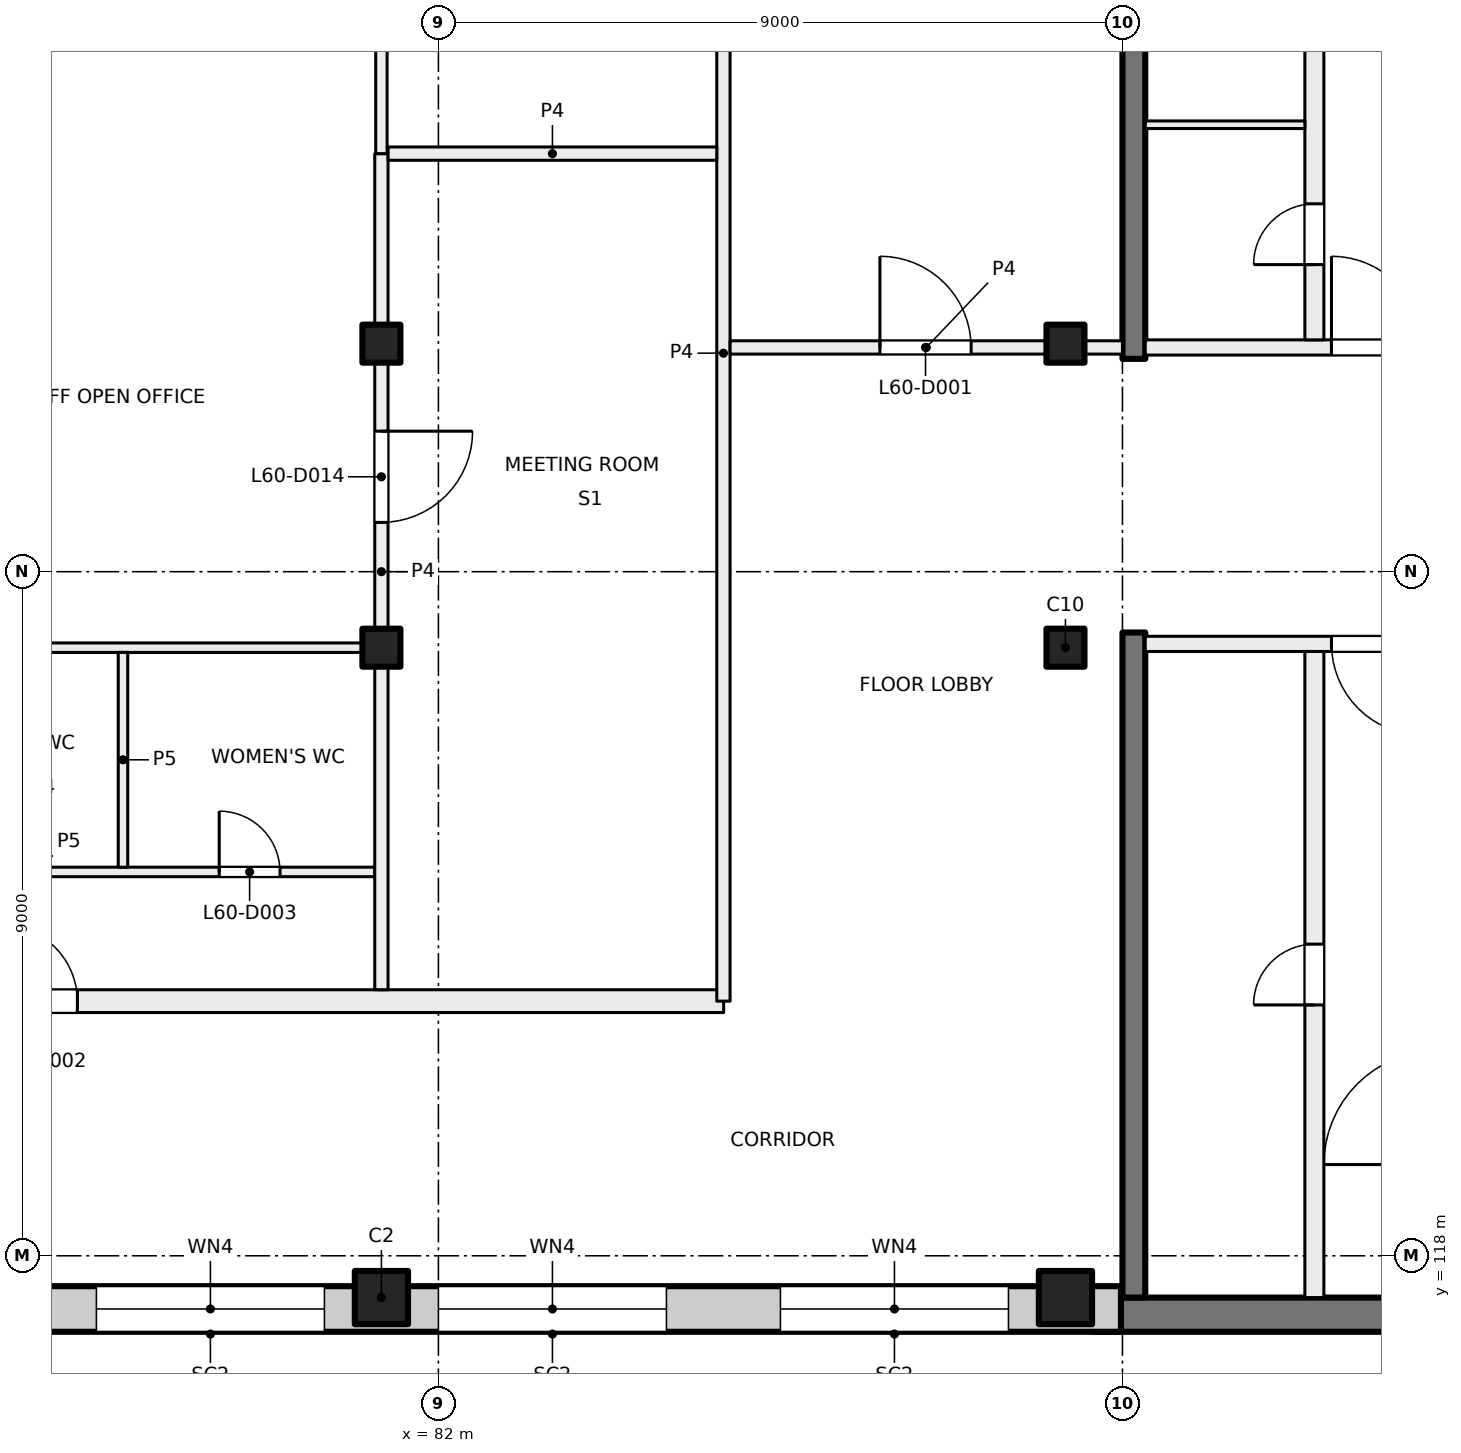
"""IFC4 building model, lengths in metres.
Left out: names, types, materials, properties, quantities, classifications, styles, units other than length and angle.
Written with IfcOpenShell. Run it as: python <this file> out.ifc"""

import sys

from ifc_helpers import new_model, si_unit, direction, frame, frame_2d, origin, origin_2d, place, context, subcontext, project, spatial, rectangle, extrude, element, fill, save


model = new_model("IFC4")
c1 = context("Model", 3, precision=1e-05, world=origin(), true_north=direction((0.0, 1.0)))
c2 = subcontext(c1, "Body", "Model", "MODEL_VIEW")
j1 = project(units=[si_unit("LENGTHUNIT", "METRE"), si_unit("PLANEANGLEUNIT", "RADIAN")], contexts=[c1])
p1 = place(None, origin())
s1 = spatial("IfcSite", under=j1, at=p1, CompositionType="ELEMENT")
p2 = place(p1, origin())
s2 = spatial("IfcBuilding", under=s1, at=p2, CompositionType="ELEMENT")
p3 = place(p2, frame((0.0, 0.0, 253.5)))
s3 = spatial("IfcBuildingStorey", under=s2, at=p3, CompositionType="ELEMENT", Elevation=253.5)
for number, where, z_axis, x_axis in (
    (1, (81.25, 130.0, 0.0), (0.0, 0.0, 1.0), (1.0, 0.0, 0.0)),
    (2, (90.25, 130.0, 0.0), (0.0, 0.0, 1.0), (1.0, 0.0, 0.0)),
    (3, (81.25, 126.0, 0.0), (0.0, 0.0, 1.0), (1.0, 0.0, 0.0)),
    (4, (90.25, 126.0, 0.0), (0.0, 0.0, 1.0), (1.0, 0.0, 0.0)),
):
    element("IfcColumn", number, at=place(p3, frame(where, z_axis=z_axis, x_axis=x_axis)), inside=s3, PredefinedType="COLUMN", context=c2, shape_type="SweptSolid", body=[
        extrude(rectangle(XDim=0.5, YDim=0.5, at=origin_2d()), origin(), (0.0, 0.0, 1.0), 4.0),
    ])
for number, where, z_axis, x_axis in (
    (5, (81.25, 117.45, 0.0), (0.0, 0.0, 1.0), (1.0, 0.0, 0.0)),
    (6, (90.25, 117.45, 0.0), (0.0, 0.0, 1.0), (1.0, 0.0, 0.0)),
):
    element("IfcColumn", number, at=place(p3, frame(where, z_axis=z_axis, x_axis=x_axis)), inside=s3, PredefinedType="COLUMN", context=c2, shape_type="SweptSolid", body=[
        extrude(rectangle(XDim=0.7, YDim=0.7, at=origin_2d()), origin(), (0.0, 0.0, 1.0), 4.0),
    ])
p4 = place(p3, frame((99.6, 117.225, 0.0), z_axis=(0.0, 0.0, 1.0), x_axis=(-1.0, 0.0, 0.0)))
e7 = element("IfcWall", 7, at=p4, inside=s3, PredefinedType="SHEAR", context=c2, shape_type="SweptSolid", body=[
    extrude(rectangle(XDim=9.0, YDim=0.45, at=frame_2d((4.5, 0.0))), origin(), (0.0, 0.0, 1.0), 4.0),
])
for number, where, z_axis, x_axis in (
    (8, (91.15, 138.55, 0.0), (0.0, 0.0, 1.0), (0.0, -1.0, 0.0)),
    (9, (91.15, 126.2, 0.0), (0.0, 0.0, 1.0), (0.0, -1.0, 0.0)),
):
    element("IfcWall", number, at=place(p3, frame(where, z_axis=z_axis, x_axis=x_axis)), inside=s3, PredefinedType="SHEAR", context=c2, shape_type="SweptSolid", body=[
        extrude(rectangle(XDim=8.75, YDim=0.3, at=frame_2d((4.375, 0.0))), origin(), (0.0, 0.0, 1.0), 4.0),
    ])
p5 = place(p3, frame((90.98, 117.3, 0.0), z_axis=(0.0, 0.0, 1.0), x_axis=(-1.0, 0.0, 0.0)))
e10 = element("IfcWall", 10, at=p5, inside=s3, PredefinedType="SOLIDWALL", context=c2, shape_type="SweptSolid", body=[
    extrude(rectangle(XDim=43.98, YDim=0.6, at=frame_2d((21.99, 0.0))), origin(), (0.0, 0.0, 1.0), 3.625),
])
p6 = place(p5, frame((1.48, 0.0, 0.9)))
e11 = element("IfcOpeningElement", 11, at=p6, cuts=e10, PredefinedType="OPENING", context=c2, shape_type="SweptSolid", body=[
    extrude(rectangle(XDim=3.0, YDim=2.4, at=frame_2d((1.5, 1.2))), frame((0.0, 0.31, 0.0), z_axis=(0.0, -1.0, 0.0), x_axis=(1.0, 0.0, 0.0)), (0.0, 0.0, 1.0), 0.62),
])
p7 = place(p5, frame((5.98, 0.0, 0.9)))
e12 = element("IfcOpeningElement", 12, at=p7, cuts=e10, PredefinedType="OPENING", context=c2, shape_type="SweptSolid", body=[
    extrude(rectangle(XDim=3.0, YDim=2.4, at=frame_2d((1.5, 1.2))), frame((0.0, 0.31, 0.0), z_axis=(0.0, -1.0, 0.0), x_axis=(1.0, 0.0, 0.0)), (0.0, 0.0, 1.0), 0.62),
])
p8 = place(p5, frame((10.48, 0.0, 0.9)))
e13 = element("IfcOpeningElement", 13, at=p8, cuts=e10, PredefinedType="OPENING", context=c2, shape_type="SweptSolid", body=[
    extrude(rectangle(XDim=3.0, YDim=2.4, at=frame_2d((1.5, 1.2))), frame((0.0, 0.31, 0.0), z_axis=(0.0, -1.0, 0.0), x_axis=(1.0, 0.0, 0.0)), (0.0, 0.0, 1.0), 0.62),
])
p9 = place(p5, frame((14.98, 0.0, 0.9)))
e14 = element("IfcOpeningElement", 14, at=p9, cuts=e10, PredefinedType="OPENING", context=c2, shape_type="SweptSolid", body=[
    extrude(rectangle(XDim=3.0, YDim=2.4, at=frame_2d((1.5, 1.2))), frame((0.0, 0.31, 0.0), z_axis=(0.0, -1.0, 0.0), x_axis=(1.0, 0.0, 0.0)), (0.0, 0.0, 1.0), 0.62),
])
p10 = place(p5, frame((19.48, 0.0, 0.9)))
e15 = element("IfcOpeningElement", 15, at=p10, cuts=e10, PredefinedType="OPENING", context=c2, shape_type="SweptSolid", body=[
    extrude(rectangle(XDim=3.0, YDim=2.4, at=frame_2d((1.5, 1.2))), frame((0.0, 0.31, 0.0), z_axis=(0.0, -1.0, 0.0), x_axis=(1.0, 0.0, 0.0)), (0.0, 0.0, 1.0), 0.62),
])
p11 = place(p5, frame((24.58, 0.0, 0.0)))
e16 = element("IfcOpeningElement", 16, at=p11, cuts=e10, PredefinedType="OPENING", context=c2, shape_type="SweptSolid", body=[
    extrude(rectangle(XDim=1.8, YDim=2.4, at=frame_2d((0.9, 1.2))), frame((0.0, 0.31, 0.0), z_axis=(0.0, -1.0, 0.0), x_axis=(1.0, 0.0, 0.0)), (0.0, 0.0, 1.0), 0.62),
])
p12 = place(p5, frame((28.48, 0.0, 0.9)))
e17 = element("IfcOpeningElement", 17, at=p12, cuts=e10, PredefinedType="OPENING", context=c2, shape_type="SweptSolid", body=[
    extrude(rectangle(XDim=3.0, YDim=2.4, at=frame_2d((1.5, 1.2))), frame((0.0, 0.31, 0.0), z_axis=(0.0, -1.0, 0.0), x_axis=(1.0, 0.0, 0.0)), (0.0, 0.0, 1.0), 0.62),
])
p13 = place(p5, frame((32.98, 0.0, 0.9)))
e18 = element("IfcOpeningElement", 18, at=p13, cuts=e10, PredefinedType="OPENING", context=c2, shape_type="SweptSolid", body=[
    extrude(rectangle(XDim=3.0, YDim=2.4, at=frame_2d((1.5, 1.2))), frame((0.0, 0.31, 0.0), z_axis=(0.0, -1.0, 0.0), x_axis=(1.0, 0.0, 0.0)), (0.0, 0.0, 1.0), 0.62),
])
p14 = place(p5, frame((38.08, 0.0, 0.0)))
e19 = element("IfcOpeningElement", 19, at=p14, cuts=e10, PredefinedType="OPENING", context=c2, shape_type="SweptSolid", body=[
    extrude(rectangle(XDim=1.8, YDim=2.4, at=frame_2d((0.9, 1.2))), frame((0.0, 0.31, 0.0), z_axis=(0.0, -1.0, 0.0), x_axis=(1.0, 0.0, 0.0)), (0.0, 0.0, 1.0), 0.62),
])
p15 = place(p3, frame((95.25, 126.05, 0.0), z_axis=(0.0, 0.0, 1.0), x_axis=(-1.0, 0.0, 0.0)))
e20 = element("IfcWall", 20, at=p15, inside=s3, PredefinedType="PARTITIONING", context=c2, shape_type="SweptSolid", body=[
    extrude(rectangle(XDim=3.95, YDim=0.2, at=frame_2d((1.975, 0.0))), origin(), (0.0, 0.0, 1.0), 3.625),
])
p16 = place(p15, frame((0.3, 0.0, 0.0)))
e21 = element("IfcOpeningElement", 21, at=p16, cuts=e20, PredefinedType="OPENING", context=c2, shape_type="SweptSolid", body=[
    extrude(rectangle(XDim=1.2, YDim=2.1, at=frame_2d((0.6, 1.05))), frame((0.0, 0.11, 0.0), z_axis=(0.0, -1.0, 0.0), x_axis=(1.0, 0.0, 0.0)), (0.0, 0.0, 1.0), 0.22),
])
p17 = place(p3, frame((93.525, 117.45, 0.0), z_axis=(0.0, 0.0, 1.0), x_axis=(0.0, 1.0, 0.0)))
e22 = element("IfcWall", 22, at=p17, inside=s3, PredefinedType="PARTITIONING", context=c2, shape_type="SweptSolid", body=[
    extrude(rectangle(XDim=8.5, YDim=0.25, at=frame_2d((4.25, 0.0))), origin(), (0.0, 0.0, 1.0), 3.625),
])
p18 = place(p17, frame((3.85, 0.0, 0.0)))
e23 = element("IfcOpeningElement", 23, at=p18, cuts=e22, PredefinedType="OPENING", context=c2, shape_type="SweptSolid", body=[
    extrude(rectangle(XDim=0.8, YDim=2.1, at=frame_2d((0.4, 1.05))), frame((0.0, 0.135, 0.0), z_axis=(0.0, -1.0, 0.0), x_axis=(1.0, 0.0, 0.0)), (0.0, 0.0, 1.0), 0.27),
])
p19 = place(p3, frame((91.3, 129.95, 0.0), z_axis=(0.0, 0.0, 1.0), x_axis=(1.0, 0.0, 0.0)))
e24 = element("IfcWall", 24, at=p19, inside=s3, PredefinedType="PARTITIONING", context=c2, shape_type="SweptSolid", body=[
    extrude(rectangle(XDim=3.95, YDim=0.2, at=frame_2d((1.975, 0.0))), origin(), (0.0, 0.0, 1.0), 3.625),
])
p20 = place(p19, frame((2.45, 0.0, 0.0)))
e25 = element("IfcOpeningElement", 25, at=p20, cuts=e24, PredefinedType="OPENING", context=c2, shape_type="SweptSolid", body=[
    extrude(rectangle(XDim=1.2, YDim=2.1, at=frame_2d((0.6, 1.05))), frame((0.0, 0.11, 0.0), z_axis=(0.0, -1.0, 0.0), x_axis=(1.0, 0.0, 0.0)), (0.0, 0.0, 1.0), 0.22),
])
p21 = place(p3, frame((93.525, 130.05, 0.0), z_axis=(0.0, 0.0, 1.0), x_axis=(0.0, 1.0, 0.0)))
e26 = element("IfcWall", 26, at=p21, inside=s3, PredefinedType="PARTITIONING", context=c2, shape_type="SweptSolid", body=[
    extrude(rectangle(XDim=8.5, YDim=0.25, at=frame_2d((4.25, 0.0))), origin(), (0.0, 0.0, 1.0), 3.625),
])
p22 = place(p21, frame((0.99, 0.0, 0.0)))
e27 = element("IfcOpeningElement", 27, at=p22, cuts=e26, PredefinedType="OPENING", context=c2, shape_type="SweptSolid", body=[
    extrude(rectangle(XDim=0.8, YDim=2.1, at=frame_2d((0.4, 1.05))), frame((0.0, 0.135, 0.0), z_axis=(0.0, -1.0, 0.0), x_axis=(1.0, 0.0, 0.0)), (0.0, 0.0, 1.0), 0.27),
])
p23 = place(p21, frame((5.29, 0.0, 0.0)))
e28 = element("IfcOpeningElement", 28, at=p23, cuts=e26, PredefinedType="OPENING", context=c2, shape_type="SweptSolid", body=[
    extrude(rectangle(XDim=0.8, YDim=2.1, at=frame_2d((0.4, 1.05))), frame((0.0, 0.135, 0.0), z_axis=(0.0, -1.0, 0.0), x_axis=(1.0, 0.0, 0.0)), (0.0, 0.0, 1.0), 0.27),
])
p24 = place(p3, frame((91.3, 132.88, 0.0), z_axis=(0.0, 0.0, 1.0), x_axis=(1.0, 0.0, 0.0)))
e29 = element("IfcWall", 29, at=p24, inside=s3, PredefinedType="PARTITIONING", context=c2, shape_type="SweptSolid", body=[
    extrude(rectangle(XDim=2.1, YDim=0.1, at=frame_2d((1.05, 0.0))), origin(), (0.0, 0.0, 1.0), 3.625),
])
p25 = place(p3, frame((54.4, 121.35, 0.0), z_axis=(0.0, 0.0, 1.0), x_axis=(1.0, 0.0, 0.0)))
e30 = element("IfcWall", 30, at=p25, inside=s3, PredefinedType="PARTITIONING", context=c2, shape_type="SweptSolid", body=[
    extrude(rectangle(XDim=31.353, YDim=0.3, at=frame_2d((15.677, 0.0))), origin(), (0.0, 0.0, 1.0), 3.625),
])
p26 = place(p25, frame((21.85, 0.0, 0.0)))
e31 = element("IfcOpeningElement", 31, at=p26, cuts=e30, PredefinedType="OPENING", context=c2, shape_type="SweptSolid", body=[
    extrude(rectangle(XDim=1.0, YDim=2.1, at=frame_2d((0.5, 1.05))), frame((0.0, 0.16, 0.0), z_axis=(0.0, -1.0, 0.0), x_axis=(1.0, 0.0, 0.0)), (0.0, 0.0, 1.0), 0.32),
])
p27 = place(p25, frame((12.75, 0.0, 0.0)))
e32 = element("IfcOpeningElement", 32, at=p27, cuts=e30, PredefinedType="OPENING", context=c2, shape_type="SweptSolid", body=[
    extrude(rectangle(XDim=1.2, YDim=2.1, at=frame_2d((0.6, 1.05))), frame((0.0, 0.16, 0.0), z_axis=(0.0, -1.0, 0.0), x_axis=(1.0, 0.0, 0.0)), (0.0, 0.0, 1.0), 0.32),
])
p28 = place(p25, frame((3.515, 0.0, 0.0)))
e33 = element("IfcOpeningElement", 33, at=p28, cuts=e30, PredefinedType="OPENING", context=c2, shape_type="SweptSolid", body=[
    extrude(rectangle(XDim=1.8, YDim=2.1, at=frame_2d((0.9, 1.05))), frame((0.0, 0.16, 0.0), z_axis=(0.0, -1.0, 0.0), x_axis=(1.0, 0.0, 0.0)), (0.0, 0.0, 1.0), 0.32),
])
p29 = place(p3, frame((72.338, 123.05, 0.0), z_axis=(0.0, 0.0, 1.0), x_axis=(1.0, 0.0, 0.0)))
e34 = element("IfcWall", 34, at=p29, inside=s3, PredefinedType="PARTITIONING", context=c2, shape_type="SweptSolid", body=[
    extrude(rectangle(XDim=8.824, YDim=0.125, at=frame_2d((4.412, 0.0))), origin(), (0.0, 0.0, 1.0), 3.625),
])
p30 = place(p29, frame((6.778, 0.0, 0.0)))
e35 = element("IfcOpeningElement", 35, at=p30, cuts=e34, PredefinedType="OPENING", context=c2, shape_type="SweptSolid", body=[
    extrude(rectangle(XDim=0.8, YDim=2.1, at=frame_2d((0.4, 1.05))), frame((0.0, 0.073, 0.0), z_axis=(0.0, -1.0, 0.0), x_axis=(1.0, 0.0, 0.0)), (0.0, 0.0, 1.0), 0.145),
])
p31 = place(p29, frame((3.612, 0.0, 0.0)))
e36 = element("IfcOpeningElement", 36, at=p31, cuts=e34, PredefinedType="OPENING", context=c2, shape_type="SweptSolid", body=[
    extrude(rectangle(XDim=0.8, YDim=2.1, at=frame_2d((0.4, 1.05))), frame((0.0, 0.073, 0.0), z_axis=(0.0, -1.0, 0.0), x_axis=(1.0, 0.0, 0.0)), (0.0, 0.0, 1.0), 0.145),
])
p32 = place(p29, frame((0.746, 0.0, 0.0)))
e37 = element("IfcOpeningElement", 37, at=p32, cuts=e34, PredefinedType="OPENING", context=c2, shape_type="SweptSolid", body=[
    extrude(rectangle(XDim=1.0, YDim=2.1, at=frame_2d((0.5, 1.05))), frame((0.0, 0.073, 0.0), z_axis=(0.0, -1.0, 0.0), x_axis=(1.0, 0.0, 0.0)), (0.0, 0.0, 1.0), 0.145),
])
p33 = place(p3, frame((72.25, 126.0, 0.0), z_axis=(0.0, 0.0, 1.0), x_axis=(1.0, 0.0, 0.0)))
e38 = element("IfcWall", 38, at=p33, inside=s3, PredefinedType="PARTITIONING", context=c2, shape_type="SweptSolid", body=[
    extrude(rectangle(XDim=8.912, YDim=0.125, at=frame_2d((4.456, 0.0))), origin(), (0.0, 0.0, 1.0), 3.625),
])
p34 = place(p3, frame((77.85, 125.938, 0.0), z_axis=(0.0, 0.0, 1.0), x_axis=(0.0, -1.0, 0.0)))
e39 = element("IfcWall", 39, at=p34, inside=s3, PredefinedType="PARTITIONING", context=c2, shape_type="SweptSolid", body=[
    extrude(rectangle(XDim=2.826, YDim=0.125, at=frame_2d((1.413, 0.0))), origin(), (0.0, 0.0, 1.0), 3.625),
])
p35 = place(p3, frame((81.25, 132.5, 0.0), z_axis=(0.0, 0.0, 1.0), x_axis=(0.0, -1.0, 0.0)))
e40 = element("IfcWall", 40, at=p35, inside=s3, PredefinedType="PARTITIONING", context=c2, shape_type="SweptSolid", body=[
    extrude(rectangle(XDim=11.0, YDim=0.175, at=frame_2d((5.5, 0.0))), origin(), (0.0, 0.0, 1.0), 3.625),
])
p36 = place(p35, frame((3.652, 0.0, 0.0)))
e41 = element("IfcOpeningElement", 41, at=p36, cuts=e40, PredefinedType="OPENING", context=c2, shape_type="SweptSolid", body=[
    extrude(rectangle(XDim=1.2, YDim=2.1, at=frame_2d((0.6, 1.05))), frame((0.0, 0.097, 0.0), z_axis=(0.0, -1.0, 0.0), x_axis=(1.0, 0.0, 0.0)), (0.0, 0.0, 1.0), 0.195),
])
p37 = place(p3, frame((81.25, 132.5, 0.0), z_axis=(0.0, 0.0, 1.0), x_axis=(0.0, 1.0, 0.0)))
e42 = element("IfcWall", 42, at=p37, inside=s3, PredefinedType="PARTITIONING", context=c2, shape_type="SweptSolid", body=[
    extrude(rectangle(XDim=5.9, YDim=0.15, at=frame_2d((2.95, 0.0))), origin(), (0.0, 0.0, 1.0), 3.625),
])
p38 = place(p37, frame((2.45, 0.0, 0.0)))
e43 = element("IfcOpeningElement", 43, at=p38, cuts=e42, PredefinedType="OPENING", context=c2, shape_type="SweptSolid", body=[
    extrude(rectangle(XDim=1.0, YDim=2.1, at=frame_2d((0.5, 1.05))), frame((0.0, 0.085, 0.0), z_axis=(0.0, -1.0, 0.0), x_axis=(1.0, 0.0, 0.0)), (0.0, 0.0, 1.0), 0.17),
])
p39 = place(p3, frame((85.75, 121.35, 0.0), z_axis=(0.0, 0.0, 1.0), x_axis=(0.0, 1.0, 0.0)))
e44 = element("IfcWall", 44, at=p39, inside=s3, PredefinedType="PARTITIONING", context=c2, shape_type="SweptSolid", body=[
    extrude(rectangle(XDim=17.05, YDim=0.175, at=frame_2d((8.525, 0.0))), origin(), (0.0, 0.0, 1.0), 3.625),
])
p40 = place(p3, frame((85.662, 132.5, 0.0), z_axis=(0.0, 0.0, 1.0), x_axis=(-1.0, 0.0, 0.0)))
e45 = element("IfcWall", 45, at=p40, inside=s3, PredefinedType="PARTITIONING", context=c2, shape_type="SweptSolid", body=[
    extrude(rectangle(XDim=4.324, YDim=0.175, at=frame_2d((2.162, 0.0))), origin(), (0.0, 0.0, 1.0), 3.625),
])
p41 = place(p3, frame((85.838, 129.95, 0.0), z_axis=(0.0, 0.0, 1.0), x_axis=(1.0, 0.0, 0.0)))
e46 = element("IfcWall", 46, at=p41, inside=s3, PredefinedType="PARTITIONING", context=c2, shape_type="SweptSolid", body=[
    extrude(rectangle(XDim=5.162, YDim=0.175, at=frame_2d((2.581, 0.0))), origin(), (0.0, 0.0, 1.0), 3.625),
])
p42 = place(p41, frame((1.971, 0.0, 0.0)))
e47 = element("IfcOpeningElement", 47, at=p42, cuts=e46, PredefinedType="OPENING", context=c2, shape_type="SweptSolid", body=[
    extrude(rectangle(XDim=1.2, YDim=2.1, at=frame_2d((0.6, 1.05))), frame((0.0, 0.097, 0.0), z_axis=(0.0, -1.0, 0.0), x_axis=(1.0, 0.0, 0.0)), (0.0, 0.0, 1.0), 0.195),
])
p43 = place(p6, origin())
e48 = element("IfcWindow", 48, at=p43, inside=s3, PartitioningType="SINGLE_PANEL", PredefinedType="WINDOW", context=c2, shape_type="SweptSolid", body=[
    extrude(rectangle(XDim=3.0, YDim=2.4, at=frame_2d((1.5, 1.2))), frame((0.0, 0.03, 0.0), z_axis=(0.0, -1.0, 0.0), x_axis=(1.0, 0.0, 0.0)), (0.0, 0.0, 1.0), 0.06),
])
fill(e11, e48)
p44 = place(p7, origin())
e49 = element("IfcWindow", 49, at=p44, inside=s3, PartitioningType="SINGLE_PANEL", PredefinedType="WINDOW", context=c2, shape_type="SweptSolid", body=[
    extrude(rectangle(XDim=3.0, YDim=2.4, at=frame_2d((1.5, 1.2))), frame((0.0, 0.03, 0.0), z_axis=(0.0, -1.0, 0.0), x_axis=(1.0, 0.0, 0.0)), (0.0, 0.0, 1.0), 0.06),
])
fill(e12, e49)
p45 = place(p8, origin())
e50 = element("IfcWindow", 50, at=p45, inside=s3, PartitioningType="SINGLE_PANEL", PredefinedType="WINDOW", context=c2, shape_type="SweptSolid", body=[
    extrude(rectangle(XDim=3.0, YDim=2.4, at=frame_2d((1.5, 1.2))), frame((0.0, 0.03, 0.0), z_axis=(0.0, -1.0, 0.0), x_axis=(1.0, 0.0, 0.0)), (0.0, 0.0, 1.0), 0.06),
])
fill(e13, e50)
p46 = place(p16, origin())
e51 = element("IfcDoor", 51, at=p46, inside=s3, OperationType="DOUBLE_DOOR_SINGLE_SWING", PredefinedType="DOOR", context=c2, shape_type="SweptSolid", body=[
    extrude(rectangle(XDim=1.2, YDim=2.1, at=frame_2d((0.6, 1.05))), frame((0.0, 0.025, 0.0), z_axis=(0.0, -1.0, 0.0), x_axis=(1.0, 0.0, 0.0)), (0.0, 0.0, 1.0), 0.05),
])
fill(e21, e51)
p47 = place(p18, origin())
e52 = element("IfcDoor", 52, at=p47, inside=s3, OperationType="SINGLE_SWING_LEFT", PredefinedType="DOOR", context=c2, shape_type="SweptSolid", body=[
    extrude(rectangle(XDim=0.8, YDim=2.1, at=frame_2d((0.4, 1.05))), frame((0.0, 0.025, 0.0), z_axis=(0.0, -1.0, 0.0), x_axis=(1.0, 0.0, 0.0)), (0.0, 0.0, 1.0), 0.05),
])
fill(e23, e52)
p48 = place(p20, origin())
e53 = element("IfcDoor", 53, at=p48, inside=s3, OperationType="DOUBLE_DOOR_SINGLE_SWING", PredefinedType="DOOR", context=c2, shape_type="SweptSolid", body=[
    extrude(rectangle(XDim=1.2, YDim=2.1, at=frame_2d((0.6, 1.05))), frame((0.0, 0.025, 0.0), z_axis=(0.0, -1.0, 0.0), x_axis=(1.0, 0.0, 0.0)), (0.0, 0.0, 1.0), 0.05),
])
fill(e25, e53)
p49 = place(p22, origin())
e54 = element("IfcDoor", 54, at=p49, inside=s3, OperationType="SINGLE_SWING_RIGHT", PredefinedType="DOOR", context=c2, shape_type="SweptSolid", body=[
    extrude(rectangle(XDim=0.8, YDim=2.1, at=frame_2d((0.4, 1.05))), frame((0.0, 0.025, 0.0), z_axis=(0.0, -1.0, 0.0), x_axis=(1.0, 0.0, 0.0)), (0.0, 0.0, 1.0), 0.05),
])
fill(e27, e54)
p50 = place(p42, origin())
e55 = element("IfcDoor", 55, at=p50, inside=s3, OperationType="DOUBLE_DOOR_SINGLE_SWING", PredefinedType="DOOR", context=c2, shape_type="SweptSolid", body=[
    extrude(rectangle(XDim=1.2, YDim=2.1, at=frame_2d((0.6, 1.05))), frame((0.0, 0.025, 0.0), z_axis=(0.0, -1.0, 0.0), x_axis=(1.0, 0.0, 0.0)), (0.0, 0.0, 1.0), 0.05),
])
fill(e47, e55)
p51 = place(p26, origin())
e56 = element("IfcDoor", 56, at=p51, inside=s3, OperationType="SINGLE_SWING_LEFT", PredefinedType="DOOR", context=c2, shape_type="SweptSolid", body=[
    extrude(rectangle(XDim=1.0, YDim=2.1, at=frame_2d((0.5, 1.05))), frame((0.0, 0.025, 0.0), z_axis=(0.0, -1.0, 0.0), x_axis=(1.0, 0.0, 0.0)), (0.0, 0.0, 1.0), 0.05),
])
fill(e31, e56)
p52 = place(p30, origin())
e57 = element("IfcDoor", 57, at=p52, inside=s3, OperationType="SINGLE_SWING_RIGHT", PredefinedType="DOOR", context=c2, shape_type="SweptSolid", body=[
    extrude(rectangle(XDim=0.8, YDim=2.1, at=frame_2d((0.4, 1.05))), frame((0.0, 0.025, 0.0), z_axis=(0.0, -1.0, 0.0), x_axis=(1.0, 0.0, 0.0)), (0.0, 0.0, 1.0), 0.05),
])
fill(e35, e57)
p53 = place(p36, origin())
e58 = element("IfcDoor", 58, at=p53, inside=s3, OperationType="DOUBLE_DOOR_SINGLE_SWING", PredefinedType="DOOR", context=c2, shape_type="SweptSolid", body=[
    extrude(rectangle(XDim=1.2, YDim=2.1, at=frame_2d((0.6, 1.05))), frame((0.0, 0.025, 0.0), z_axis=(0.0, -1.0, 0.0), x_axis=(1.0, 0.0, 0.0)), (0.0, 0.0, 1.0), 0.05),
])
fill(e41, e58)
save(model, sys.argv[1])
